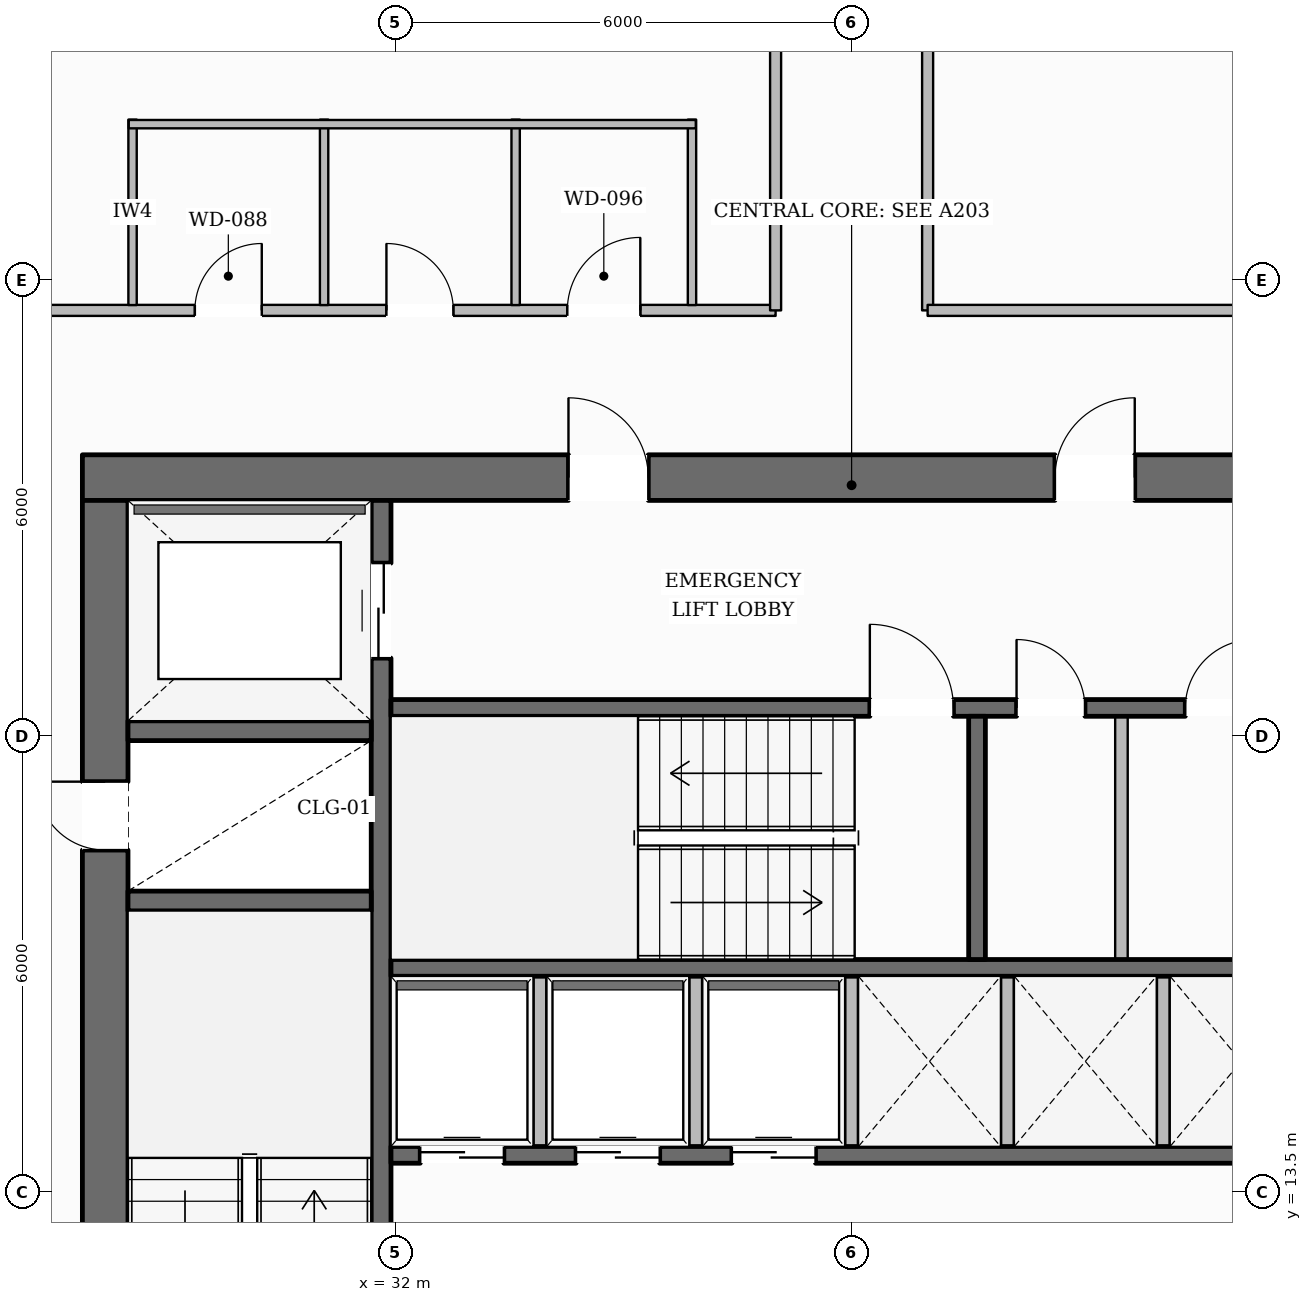
"""IFC4 building model, lengths in metres.
Left out: names, types, materials, properties, quantities, classifications, styles, units other than length and angle.
Written with IfcOpenShell. Run it as: python <this file> out.ifc"""

import sys

from ifc_helpers import new_model, si_unit, direction, frame, frame_2d, origin, place, context, subcontext, project, spatial, rectangle, extrude, element, fill, save


model = new_model("IFC4")
c1 = context("Model", 3, precision=1e-05, world=origin(), true_north=direction((0.0, 1.0)))
c2 = subcontext(c1, "Body", "Model", "MODEL_VIEW")
j1 = project(units=[si_unit("LENGTHUNIT", "METRE"), si_unit("PLANEANGLEUNIT", "RADIAN")], contexts=[c1])
p1 = place(None, origin())
s1 = spatial("IfcSite", under=j1, at=p1, CompositionType="ELEMENT")
p2 = place(p1, origin())
s2 = spatial("IfcBuilding", under=s1, at=p2, CompositionType="ELEMENT")
p3 = place(p2, frame((0.0, 0.0, 13.7)))
s3 = spatial("IfcBuildingStorey", under=s2, at=p3, CompositionType="ELEMENT", Elevation=13.7)
p4 = place(p3, frame((27.88, 22.9, 0.0), z_axis=(0.0, 0.0, 1.0), x_axis=(1.0, 0.0, 0.0)))
e1 = element("IfcWall", 1, at=p4, inside=s3, PredefinedType="SOLIDWALL", context=c2, shape_type="SweptSolid", body=[
    extrude(rectangle(XDim=20.24, YDim=0.6, at=frame_2d((10.12, 0.0))), origin(), (0.0, 0.0, 1.0), 3.59),
])
p5 = place(p4, frame((6.395, 0.0, 0.0)))
e2 = element("IfcOpeningElement", 2, at=p5, cuts=e1, PredefinedType="OPENING", context=c2, shape_type="SweptSolid", body=[
    extrude(rectangle(XDim=1.05, YDim=2.15, at=frame_2d((0.525, 1.075))), frame((0.0, 0.31, 0.0), z_axis=(0.0, -1.0, 0.0), x_axis=(1.0, 0.0, 0.0)), (0.0, 0.0, 1.0), 0.62),
])
p6 = place(p4, frame((12.795, 0.0, 0.0)))
e3 = element("IfcOpeningElement", 3, at=p6, cuts=e1, PredefinedType="OPENING", context=c2, shape_type="SweptSolid", body=[
    extrude(rectangle(XDim=1.05, YDim=2.15, at=frame_2d((0.525, 1.075))), frame((0.0, 0.31, 0.0), z_axis=(0.0, -1.0, 0.0), x_axis=(1.0, 0.0, 0.0)), (0.0, 0.0, 1.0), 0.62),
])
p7 = place(p3, frame((28.18, 9.6, 0.0), z_axis=(0.0, 0.0, 1.0), x_axis=(0.0, 1.0, 0.0)))
e4 = element("IfcWall", 4, at=p7, inside=s3, PredefinedType="SOLIDWALL", context=c2, shape_type="SweptSolid", body=[
    extrude(rectangle(XDim=13.0, YDim=0.6, at=frame_2d((6.5, 0.0))), origin(), (0.0, 0.0, 1.0), 3.59),
])
p8 = place(p7, frame((0.2, 0.0, 0.0)))
e5 = element("IfcOpeningElement", 5, at=p8, cuts=e4, PredefinedType="OPENING", context=c2, shape_type="SweptSolid", body=[
    extrude(rectangle(XDim=1.1, YDim=2.15, at=frame_2d((0.55, 1.075))), frame((0.0, 0.31, 0.0), z_axis=(0.0, -1.0, 0.0), x_axis=(1.0, 0.0, 0.0)), (0.0, 0.0, 1.0), 0.62),
])
p9 = place(p7, frame((8.4, 0.0, 0.0)))
e6 = element("IfcOpeningElement", 6, at=p9, cuts=e4, PredefinedType="OPENING", context=c2, shape_type="SweptSolid", body=[
    extrude(rectangle(XDim=0.9, YDim=2.1, at=frame_2d((0.45, 1.05))), frame((0.0, 0.31, 0.0), z_axis=(0.0, -1.0, 0.0), x_axis=(1.0, 0.0, 0.0)), (0.0, 0.0, 1.0), 0.62),
])
p10 = place(p3, frame((31.81, 9.6, 0.0), z_axis=(0.0, 0.0, 1.0), x_axis=(0.0, 1.0, 0.0)))
e7 = element("IfcWall", 7, at=p10, inside=s3, PredefinedType="SHEAR", context=c2, shape_type="SweptSolid", body=[
    extrude(rectangle(XDim=13.0, YDim=0.26, at=frame_2d((6.5, 0.0))), origin(), (0.0, 0.0, 1.0), 3.59),
])
p11 = place(p10, frame((10.925, 0.0, 0.0)))
e8 = element("IfcOpeningElement", 8, at=p11, cuts=e7, PredefinedType="OPENING", context=c2, shape_type="SweptSolid", body=[
    extrude(rectangle(XDim=1.25, YDim=2.25, at=frame_2d((0.625, 1.125))), frame((0.0, 0.14, 0.0), z_axis=(0.0, -1.0, 0.0), x_axis=(1.0, 0.0, 0.0)), (0.0, 0.0, 1.0), 0.28),
])
for number, where, z_axis, x_axis in (
    (9, (28.48, 17.33, 0.0), (0.0, 0.0, 1.0), (1.0, 0.0, 0.0)),
    (10, (28.48, 19.57, 0.0), (0.0, 0.0, 1.0), (1.0, 0.0, 0.0)),
):
    element("IfcWall", number, at=place(p3, frame(where, z_axis=z_axis, x_axis=x_axis)), inside=s3, PredefinedType="SHEAR", context=c2, shape_type="SweptSolid", body=[
        extrude(rectangle(XDim=3.2, YDim=0.26, at=frame_2d((1.6, 0.0))), origin(), (0.0, 0.0, 1.0), 3.59),
    ])
p12 = place(p3, frame((31.94, 19.87, 0.0), z_axis=(0.0, 0.0, 1.0), x_axis=(1.0, 0.0, 0.0)))
e11 = element("IfcWall", 11, at=p12, inside=s3, PredefinedType="SOLIDWALL", context=c2, shape_type="SweptSolid", body=[
    extrude(rectangle(XDim=12.12, YDim=0.22, at=frame_2d((6.06, 0.0))), origin(), (0.0, 0.0, 1.0), 3.59),
])
p13 = place(p12, frame((6.3, 0.0, 0.0)))
e12 = element("IfcOpeningElement", 12, at=p13, cuts=e11, PredefinedType="OPENING", context=c2, shape_type="SweptSolid", body=[
    extrude(rectangle(XDim=1.1, YDim=2.15, at=frame_2d((0.55, 1.075))), frame((0.0, 0.12, 0.0), z_axis=(0.0, -1.0, 0.0), x_axis=(1.0, 0.0, 0.0)), (0.0, 0.0, 1.0), 0.24),
])
p14 = place(p12, frame((8.23, 0.0, 0.0)))
e13 = element("IfcOpeningElement", 13, at=p14, cuts=e11, PredefinedType="OPENING", context=c2, shape_type="SweptSolid", body=[
    extrude(rectangle(XDim=0.9, YDim=2.1, at=frame_2d((0.45, 1.05))), frame((0.0, 0.12, 0.0), z_axis=(0.0, -1.0, 0.0), x_axis=(1.0, 0.0, 0.0)), (0.0, 0.0, 1.0), 0.24),
])
p15 = place(p12, frame((10.45, 0.0, 0.0)))
e14 = element("IfcOpeningElement", 14, at=p15, cuts=e11, PredefinedType="OPENING", context=c2, shape_type="SweptSolid", body=[
    extrude(rectangle(XDim=0.9, YDim=2.1, at=frame_2d((0.45, 1.05))), frame((0.0, 0.12, 0.0), z_axis=(0.0, -1.0, 0.0), x_axis=(1.0, 0.0, 0.0)), (0.0, 0.0, 1.0), 0.24),
])
p16 = place(p3, frame((31.94, 16.45, 0.0), z_axis=(0.0, 0.0, 1.0), x_axis=(1.0, 0.0, 0.0)))
e15 = element("IfcWall", 15, at=p16, inside=s3, PredefinedType="SOLIDWALL", context=c2, shape_type="SweptSolid", body=[
    extrude(rectangle(XDim=12.12, YDim=0.22, at=frame_2d((6.06, 0.0))), origin(), (0.0, 0.0, 1.0), 3.59),
])
p17 = place(p3, frame((39.65, 16.56, 0.0), z_axis=(0.0, 0.0, 1.0), x_axis=(0.0, 1.0, 0.0)))
e16 = element("IfcWall", 16, at=p17, inside=s3, PredefinedType="SOLIDWALL", context=c2, shape_type="SweptSolid", body=[
    extrude(rectangle(XDim=3.2, YDim=0.22, at=frame_2d((1.6, 0.0))), origin(), (0.0, 0.0, 1.0), 3.59),
])
p18 = place(p3, frame((31.94, 13.99, 0.0), z_axis=(0.0, 0.0, 1.0), x_axis=(1.0, 0.0, 0.0)))
e17 = element("IfcWall", 17, at=p18, inside=s3, PredefinedType="SOLIDWALL", context=c2, shape_type="SweptSolid", body=[
    extrude(rectangle(XDim=12.12, YDim=0.22, at=frame_2d((6.06, 0.0))), origin(), (0.0, 0.0, 1.0), 3.59),
])
p19 = place(p18, frame((0.385, 0.0, 0.0)))
e18 = element("IfcOpeningElement", 18, at=p19, cuts=e17, PredefinedType="OPENING", context=c2, shape_type="SweptSolid", body=[
    extrude(rectangle(XDim=1.1, YDim=2.2, at=frame_2d((0.55, 1.1))), frame((0.0, 0.12, 0.0), z_axis=(0.0, -1.0, 0.0), x_axis=(1.0, 0.0, 0.0)), (0.0, 0.0, 1.0), 0.24),
])
p20 = place(p18, frame((2.435, 0.0, 0.0)))
e19 = element("IfcOpeningElement", 19, at=p20, cuts=e17, PredefinedType="OPENING", context=c2, shape_type="SweptSolid", body=[
    extrude(rectangle(XDim=1.1, YDim=2.2, at=frame_2d((0.55, 1.1))), frame((0.0, 0.12, 0.0), z_axis=(0.0, -1.0, 0.0), x_axis=(1.0, 0.0, 0.0)), (0.0, 0.0, 1.0), 0.24),
])
p21 = place(p18, frame((4.485, 0.0, 0.0)))
e20 = element("IfcOpeningElement", 20, at=p21, cuts=e17, PredefinedType="OPENING", context=c2, shape_type="SweptSolid", body=[
    extrude(rectangle(XDim=1.1, YDim=2.2, at=frame_2d((0.55, 1.1))), frame((0.0, 0.12, 0.0), z_axis=(0.0, -1.0, 0.0), x_axis=(1.0, 0.0, 0.0)), (0.0, 0.0, 1.0), 0.24),
])
p22 = place(p3, frame((13.108, 15.002, 0.0), z_axis=(0.0, 0.0, 1.0), x_axis=(0.498757610738, 0.866741510331, 0.0)))
e21 = element("IfcWall", 21, at=p22, inside=s3, PredefinedType="STANDARD", context=c2, shape_type="SweptSolid", body=[
    extrude(rectangle(XDim=33.716, YDim=0.38, at=frame_2d((16.858, 0.0))), origin(), (0.0, 0.0, 1.0), 2.97),
])
p23 = place(p22, frame((29.684, 0.0, 0.65)))
e22 = element("IfcOpeningElement", 22, at=p23, cuts=e21, PredefinedType="OPENING", context=c2, shape_type="SweptSolid", body=[
    extrude(rectangle(XDim=1.65, YDim=1.75, at=frame_2d((0.825, 0.875))), frame((0.0, 0.2, 0.0), z_axis=(0.0, -1.0, 0.0), x_axis=(1.0, 0.0, 0.0)), (0.0, 0.0, 1.0), 0.4),
])
p24 = place(p22, frame((24.223, 0.0, 0.65)))
e23 = element("IfcOpeningElement", 23, at=p24, cuts=e21, PredefinedType="OPENING", context=c2, shape_type="SweptSolid", body=[
    extrude(rectangle(XDim=1.65, YDim=1.75, at=frame_2d((0.825, 0.875))), frame((0.0, 0.2, 0.0), z_axis=(0.0, -1.0, 0.0), x_axis=(1.0, 0.0, 0.0)), (0.0, 0.0, 1.0), 0.4),
])
p25 = place(p22, frame((13.302, 0.0, 0.65)))
e24 = element("IfcOpeningElement", 24, at=p25, cuts=e21, PredefinedType="OPENING", context=c2, shape_type="SweptSolid", body=[
    extrude(rectangle(XDim=1.65, YDim=1.75, at=frame_2d((0.825, 0.875))), frame((0.0, 0.2, 0.0), z_axis=(0.0, -1.0, 0.0), x_axis=(1.0, 0.0, 0.0)), (0.0, 0.0, 1.0), 0.4),
])
p26 = place(p22, frame((7.841, 0.0, 0.65)))
e25 = element("IfcOpeningElement", 25, at=p26, cuts=e21, PredefinedType="OPENING", context=c2, shape_type="SweptSolid", body=[
    extrude(rectangle(XDim=1.65, YDim=1.75, at=frame_2d((0.825, 0.875))), frame((0.0, 0.2, 0.0), z_axis=(0.0, -1.0, 0.0), x_axis=(1.0, 0.0, 0.0)), (0.0, 0.0, 1.0), 0.4),
])
p27 = place(p22, frame((2.38, 0.0, 0.65)))
e26 = element("IfcOpeningElement", 26, at=p27, cuts=e21, PredefinedType="OPENING", context=c2, shape_type="SweptSolid", body=[
    extrude(rectangle(XDim=1.65, YDim=1.75, at=frame_2d((0.825, 0.875))), frame((0.0, 0.2, 0.0), z_axis=(0.0, -1.0, 0.0), x_axis=(1.0, 0.0, 0.0)), (0.0, 0.0, 1.0), 0.4),
])
for number, where, z_axis, x_axis in (
    (27, (33.9, 14.1, 0.0), (0.0, 0.0, 1.0), (0.0, 1.0, 0.0)),
    (28, (35.95, 14.1, 0.0), (0.0, 0.0, 1.0), (0.0, 1.0, 0.0)),
    (29, (38.0, 14.1, 0.0), (0.0, 0.0, 1.0), (0.0, 1.0, 0.0)),
    (30, (40.05, 14.1, 0.0), (0.0, 0.0, 1.0), (0.0, 1.0, 0.0)),
    (31, (42.1, 14.1, 0.0), (0.0, 0.0, 1.0), (0.0, 1.0, 0.0)),
):
    element("IfcWall", number, at=place(p3, frame(where, z_axis=z_axis, x_axis=x_axis)), inside=s3, PredefinedType="PARTITIONING", context=c2, shape_type="SweptSolid", body=[
        extrude(rectangle(XDim=2.24, YDim=0.165, at=frame_2d((1.12, 0.0))), origin(), (0.0, 0.0, 1.0), 3.59),
    ])
p28 = place(p3, frame((41.55, 16.56, 0.0), z_axis=(0.0, 0.0, 1.0), x_axis=(0.0, 1.0, 0.0)))
e32 = element("IfcWall", 32, at=p28, inside=s3, PredefinedType="PARTITIONING", context=c2, shape_type="SweptSolid", body=[
    extrude(rectangle(XDim=3.2, YDim=0.165, at=frame_2d((1.6, 0.0))), origin(), (0.0, 0.0, 1.0), 3.59),
])
p29 = place(p3, frame((25.98, 25.1, 0.0), z_axis=(0.0, 0.0, 1.0), x_axis=(1.0, 0.0, 0.0)))
e33 = element("IfcWall", 33, at=p29, inside=s3, PredefinedType="PARTITIONING", context=c2, shape_type="SweptSolid", body=[
    extrude(rectangle(XDim=11.02, YDim=0.145, at=frame_2d((5.51, 0.0))), origin(), (0.0, 0.0, 1.0), 3.59),
])
p30 = place(p29, frame((3.38, 0.0, 0.0)))
e34 = element("IfcOpeningElement", 34, at=p30, cuts=e33, PredefinedType="OPENING", context=c2, shape_type="SweptSolid", body=[
    extrude(rectangle(XDim=0.88, YDim=2.1, at=frame_2d((0.44, 1.05))), frame((0.0, 0.083, 0.0), z_axis=(0.0, -1.0, 0.0), x_axis=(1.0, 0.0, 0.0)), (0.0, 0.0, 1.0), 0.165),
])
p31 = place(p29, frame((5.9, 0.0, 0.0)))
e35 = element("IfcOpeningElement", 35, at=p31, cuts=e33, PredefinedType="OPENING", context=c2, shape_type="SweptSolid", body=[
    extrude(rectangle(XDim=0.88, YDim=2.1, at=frame_2d((0.44, 1.05))), frame((0.0, 0.083, 0.0), z_axis=(0.0, -1.0, 0.0), x_axis=(1.0, 0.0, 0.0)), (0.0, 0.0, 1.0), 0.165),
])
p32 = place(p29, frame((8.28, 0.0, 0.0)))
e36 = element("IfcOpeningElement", 36, at=p32, cuts=e33, PredefinedType="OPENING", context=c2, shape_type="SweptSolid", body=[
    extrude(rectangle(XDim=0.96, YDim=2.1, at=frame_2d((0.48, 1.05))), frame((0.0, 0.083, 0.0), z_axis=(0.0, -1.0, 0.0), x_axis=(1.0, 0.0, 0.0)), (0.0, 0.0, 1.0), 0.165),
])
p33 = place(p3, frame((37.0, 25.1, 0.0), z_axis=(0.0, 0.0, 1.0), x_axis=(0.0, 1.0, 0.0)))
e37 = element("IfcWall", 37, at=p33, inside=s3, PredefinedType="PARTITIONING", context=c2, shape_type="SweptSolid", body=[
    extrude(rectangle(XDim=13.1, YDim=0.145, at=frame_2d((6.55, 0.0))), origin(), (0.0, 0.0, 1.0), 3.59),
])
p34 = place(p33, frame((5.85, 0.0, 0.0)))
e38 = element("IfcOpeningElement", 38, at=p34, cuts=e37, PredefinedType="OPENING", context=c2, shape_type="SweptSolid", body=[
    extrude(rectangle(XDim=1.4, YDim=2.2, at=frame_2d((0.7, 1.1))), frame((0.0, 0.083, 0.0), z_axis=(0.0, -1.0, 0.0), x_axis=(1.0, 0.0, 0.0)), (0.0, 0.0, 1.0), 0.165),
])
p35 = place(p3, frame((39.0, 38.2, 0.0), z_axis=(0.0, 0.0, 1.0), x_axis=(0.0, -1.0, 0.0)))
e39 = element("IfcWall", 39, at=p35, inside=s3, PredefinedType="PARTITIONING", context=c2, shape_type="SweptSolid", body=[
    extrude(rectangle(XDim=13.1, YDim=0.145, at=frame_2d((6.55, 0.0))), origin(), (0.0, 0.0, 1.0), 3.59),
])
p36 = place(p3, frame((39.0, 25.1, 0.0), z_axis=(0.0, 0.0, 1.0), x_axis=(1.0, 0.0, 0.0)))
e40 = element("IfcWall", 40, at=p36, inside=s3, PredefinedType="PARTITIONING", context=c2, shape_type="SweptSolid", body=[
    extrude(rectangle(XDim=11.02, YDim=0.145, at=frame_2d((5.51, 0.0))), origin(), (0.0, 0.0, 1.0), 3.59),
])
p37 = place(p3, frame((28.54, 25.17, 0.0), z_axis=(0.0, 0.0, 1.0), x_axis=(0.0, 1.0, 0.0)))
e41 = element("IfcWall", 41, at=p37, inside=s3, PredefinedType="PLUMBINGWALL", context=c2, shape_type="SweptSolid", body=[
    extrude(rectangle(XDim=2.44, YDim=0.11, at=frame_2d((1.22, 0.0))), origin(), (0.0, 0.0, 1.0), 3.057),
])
for number, where, z_axis, x_axis in (
    (42, (31.06, 25.17, 0.0), (0.0, 0.0, 1.0), (0.0, 1.0, 0.0)),
    (43, (33.58, 25.17, 0.0), (0.0, 0.0, 1.0), (0.0, 1.0, 0.0)),
    (44, (35.9, 25.17, 0.0), (0.0, 0.0, 1.0), (0.0, 1.0, 0.0)),
):
    element("IfcWall", number, at=place(p3, frame(where, z_axis=z_axis, x_axis=x_axis)), inside=s3, PredefinedType="PLUMBINGWALL", context=c2, shape_type="SweptSolid", body=[
        extrude(rectangle(XDim=2.44, YDim=0.11, at=frame_2d((1.22, 0.0))), origin(), (0.0, 0.0, 1.0), 3.59),
    ])
p38 = place(p3, frame((28.49, 27.55, 0.0), z_axis=(0.0, 0.0, 1.0), x_axis=(1.0, 0.0, 0.0)))
e45 = element("IfcWall", 45, at=p38, inside=s3, PredefinedType="PLUMBINGWALL", context=c2, shape_type="SweptSolid", body=[
    extrude(rectangle(XDim=7.46, YDim=0.11, at=frame_2d((3.73, 0.0))), origin(), (0.0, 0.0, 1.0), 3.59),
])
p39 = place(p13, origin())
e46 = element("IfcDoor", 46, at=p39, inside=s3, OperationType="SINGLE_SWING_LEFT", PredefinedType="DOOR", context=c2, shape_type="SweptSolid", body=[
    extrude(rectangle(XDim=1.1, YDim=2.15, at=frame_2d((0.55, 1.075))), frame((0.0, 0.025, 0.0), z_axis=(0.0, -1.0, 0.0), x_axis=(1.0, 0.0, 0.0)), (0.0, 0.0, 1.0), 0.05),
])
fill(e12, e46)
p40 = place(p9, origin())
e47 = element("IfcDoor", 47, at=p40, inside=s3, OperationType="SINGLE_SWING_RIGHT", PredefinedType="DOOR", context=c2, shape_type="SweptSolid", body=[
    extrude(rectangle(XDim=0.9, YDim=2.1, at=frame_2d((0.45, 1.05))), frame((0.0, 0.025, 0.0), z_axis=(0.0, -1.0, 0.0), x_axis=(1.0, 0.0, 0.0)), (0.0, 0.0, 1.0), 0.05),
])
fill(e6, e47)
p41 = place(p5, origin())
e48 = element("IfcDoor", 48, at=p41, inside=s3, OperationType="SINGLE_SWING_LEFT", PredefinedType="DOOR", context=c2, shape_type="SweptSolid", body=[
    extrude(rectangle(XDim=1.05, YDim=2.15, at=frame_2d((0.525, 1.075))), frame((0.0, 0.025, 0.0), z_axis=(0.0, -1.0, 0.0), x_axis=(1.0, 0.0, 0.0)), (0.0, 0.0, 1.0), 0.05),
])
fill(e2, e48)
p42 = place(p6, origin())
e49 = element("IfcDoor", 49, at=p42, inside=s3, OperationType="SINGLE_SWING_RIGHT", PredefinedType="DOOR", context=c2, shape_type="SweptSolid", body=[
    extrude(rectangle(XDim=1.05, YDim=2.15, at=frame_2d((0.525, 1.075))), frame((0.0, 0.025, 0.0), z_axis=(0.0, -1.0, 0.0), x_axis=(1.0, 0.0, 0.0)), (0.0, 0.0, 1.0), 0.05),
])
fill(e3, e49)
p43 = place(p11, origin())
e50 = element("IfcDoor", 50, at=p43, inside=s3, OperationType="DOUBLE_DOOR_SLIDING", PredefinedType="DOOR", context=c2, shape_type="SweptSolid", body=[
    extrude(rectangle(XDim=1.25, YDim=2.25, at=frame_2d((0.625, 1.125))), frame((0.0, 0.025, 0.0), z_axis=(0.0, -1.0, 0.0), x_axis=(1.0, 0.0, 0.0)), (0.0, 0.0, 1.0), 0.05),
])
fill(e8, e50)
p44 = place(p19, origin())
e51 = element("IfcDoor", 51, at=p44, inside=s3, OperationType="DOUBLE_DOOR_SLIDING", PredefinedType="DOOR", context=c2, shape_type="SweptSolid", body=[
    extrude(rectangle(XDim=1.1, YDim=2.2, at=frame_2d((0.55, 1.1))), frame((0.0, 0.025, 0.0), z_axis=(0.0, -1.0, 0.0), x_axis=(1.0, 0.0, 0.0)), (0.0, 0.0, 1.0), 0.05),
])
fill(e18, e51)
p45 = place(p20, origin())
e52 = element("IfcDoor", 52, at=p45, inside=s3, OperationType="DOUBLE_DOOR_SLIDING", PredefinedType="DOOR", context=c2, shape_type="SweptSolid", body=[
    extrude(rectangle(XDim=1.1, YDim=2.2, at=frame_2d((0.55, 1.1))), frame((0.0, 0.025, 0.0), z_axis=(0.0, -1.0, 0.0), x_axis=(1.0, 0.0, 0.0)), (0.0, 0.0, 1.0), 0.05),
])
fill(e19, e52)
p46 = place(p21, origin())
e53 = element("IfcDoor", 53, at=p46, inside=s3, OperationType="DOUBLE_DOOR_SLIDING", PredefinedType="DOOR", context=c2, shape_type="SweptSolid", body=[
    extrude(rectangle(XDim=1.1, YDim=2.2, at=frame_2d((0.55, 1.1))), frame((0.0, 0.025, 0.0), z_axis=(0.0, -1.0, 0.0), x_axis=(1.0, 0.0, 0.0)), (0.0, 0.0, 1.0), 0.05),
])
fill(e20, e53)
p47 = place(p14, origin())
e54 = element("IfcDoor", 54, at=p47, inside=s3, OperationType="SINGLE_SWING_LEFT", PredefinedType="DOOR", context=c2, shape_type="SweptSolid", body=[
    extrude(rectangle(XDim=0.9, YDim=2.1, at=frame_2d((0.45, 1.05))), frame((0.0, 0.025, 0.0), z_axis=(0.0, -1.0, 0.0), x_axis=(1.0, 0.0, 0.0)), (0.0, 0.0, 1.0), 0.05),
])
fill(e13, e54)
p48 = place(p15, origin())
e55 = element("IfcDoor", 55, at=p48, inside=s3, OperationType="SINGLE_SWING_RIGHT", PredefinedType="DOOR", context=c2, shape_type="SweptSolid", body=[
    extrude(rectangle(XDim=0.9, YDim=2.1, at=frame_2d((0.45, 1.05))), frame((0.0, 0.025, 0.0), z_axis=(0.0, -1.0, 0.0), x_axis=(1.0, 0.0, 0.0)), (0.0, 0.0, 1.0), 0.05),
])
fill(e14, e55)
p49 = place(p30, origin())
e56 = element("IfcDoor", 56, at=p49, inside=s3, OperationType="SINGLE_SWING_RIGHT", PredefinedType="DOOR", context=c2, shape_type="SweptSolid", body=[
    extrude(rectangle(XDim=0.88, YDim=2.1, at=frame_2d((0.44, 1.05))), frame((0.0, 0.025, 0.0), z_axis=(0.0, -1.0, 0.0), x_axis=(1.0, 0.0, 0.0)), (0.0, 0.0, 1.0), 0.05),
])
fill(e34, e56)
p50 = place(p31, origin())
e57 = element("IfcDoor", 57, at=p50, inside=s3, OperationType="SINGLE_SWING_LEFT", PredefinedType="DOOR", context=c2, shape_type="SweptSolid", body=[
    extrude(rectangle(XDim=0.88, YDim=2.1, at=frame_2d((0.44, 1.05))), frame((0.0, 0.025, 0.0), z_axis=(0.0, -1.0, 0.0), x_axis=(1.0, 0.0, 0.0)), (0.0, 0.0, 1.0), 0.05),
])
fill(e35, e57)
p51 = place(p32, origin())
e58 = element("IfcDoor", 58, at=p51, inside=s3, OperationType="SINGLE_SWING_RIGHT", PredefinedType="DOOR", context=c2, shape_type="SweptSolid", body=[
    extrude(rectangle(XDim=0.96, YDim=2.1, at=frame_2d((0.48, 1.05))), frame((0.0, 0.025, 0.0), z_axis=(0.0, -1.0, 0.0), x_axis=(1.0, 0.0, 0.0)), (0.0, 0.0, 1.0), 0.05),
])
fill(e36, e58)
save(model, sys.argv[1])
